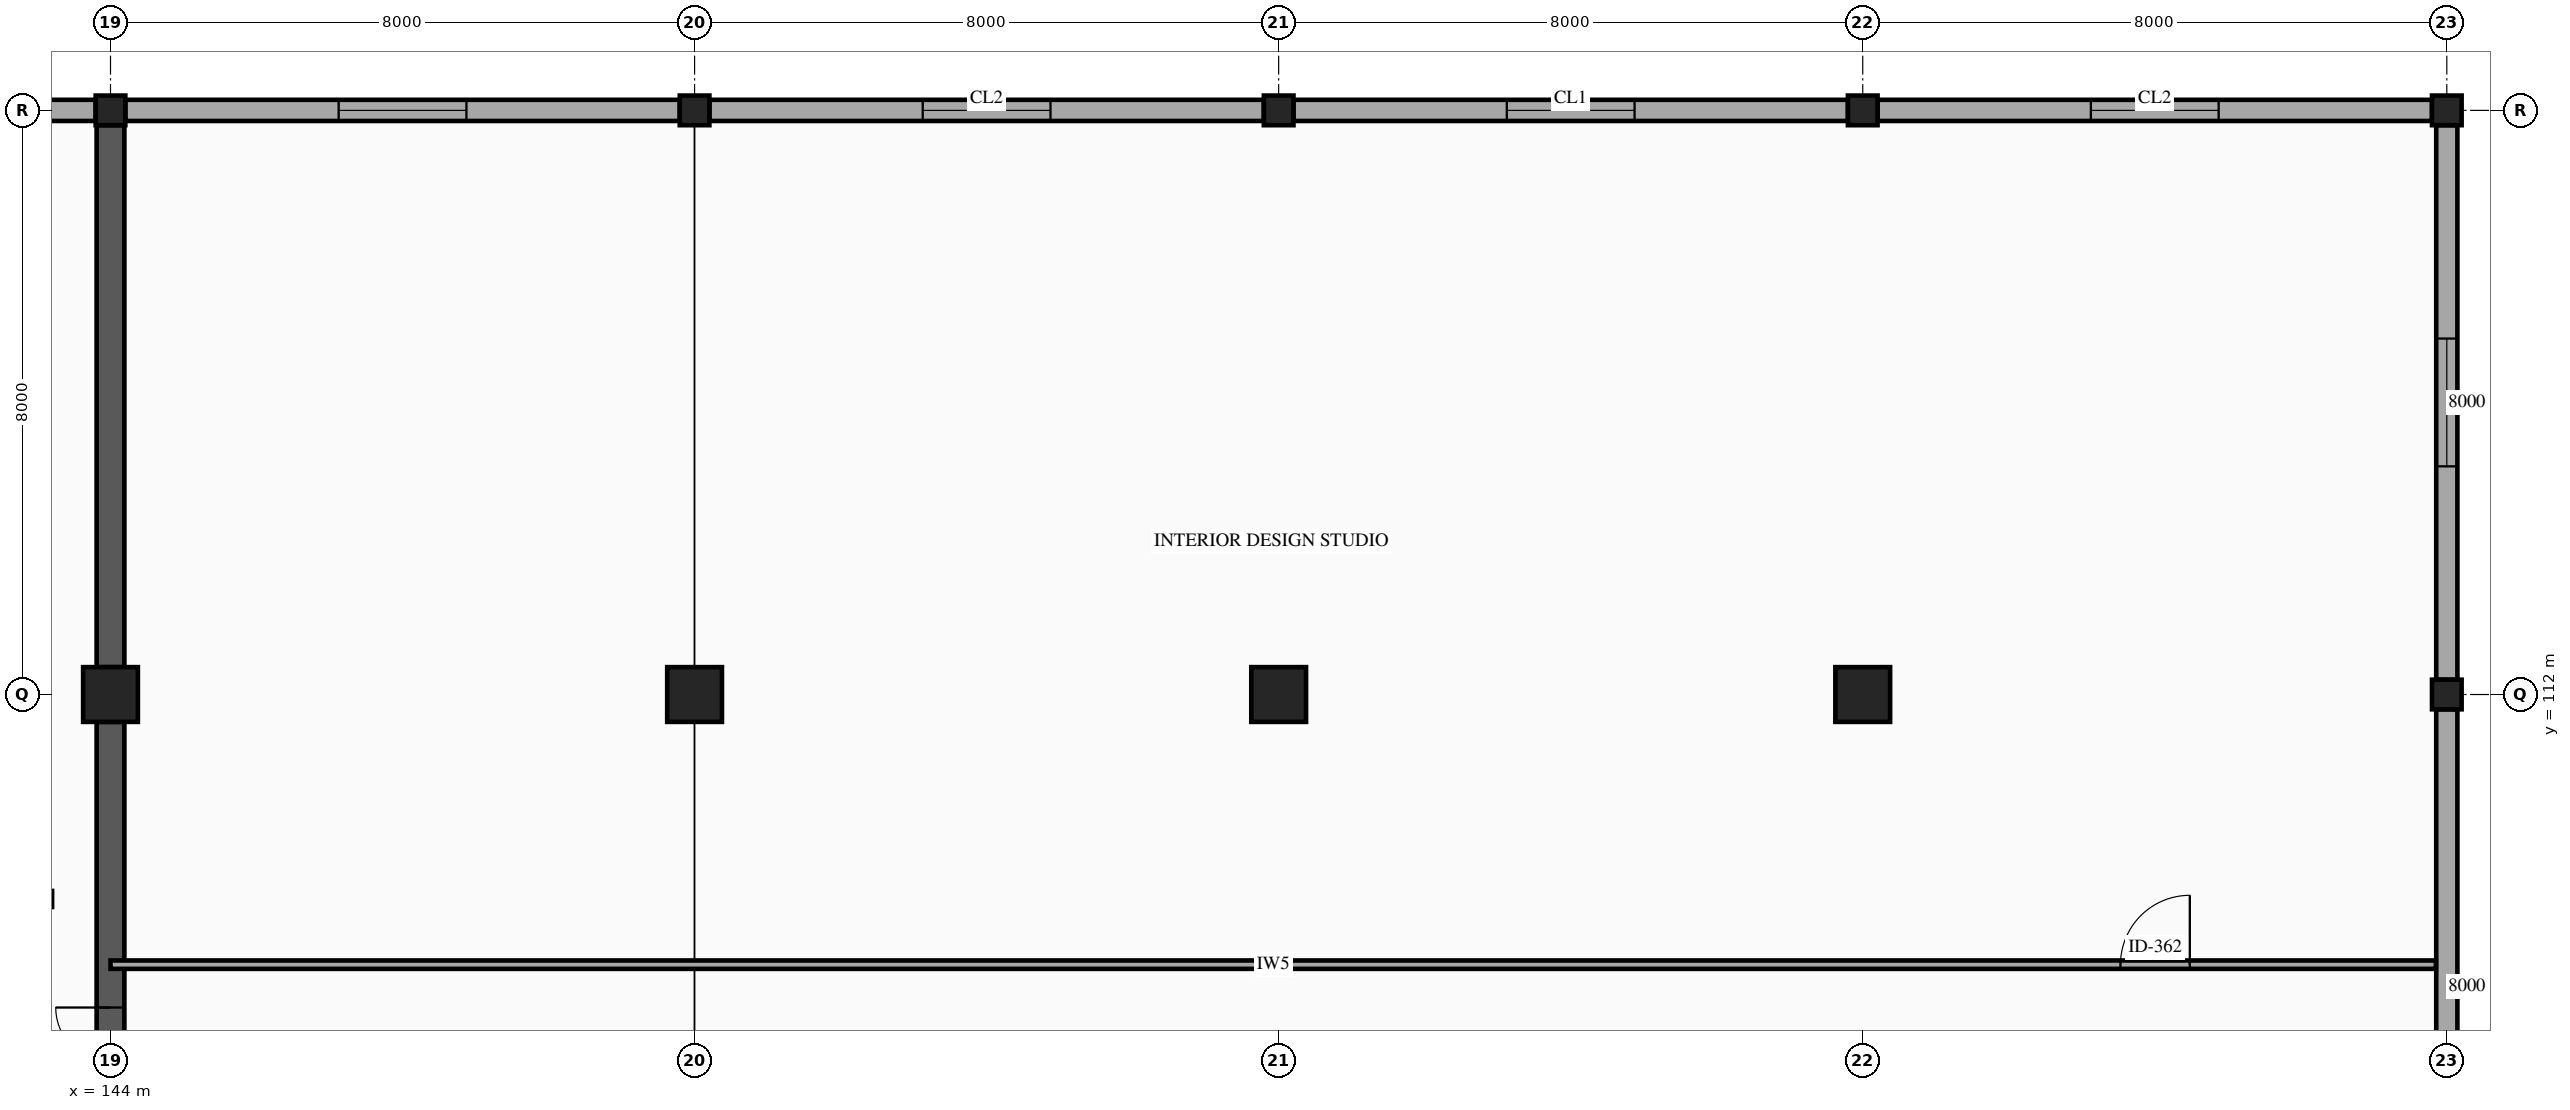
"""IFC4 building model, lengths in metres.
Left out: names, types, materials, properties, quantities, classifications, styles, units other than length and angle.
Written with IfcOpenShell. Run it as: python <this file> out.ifc"""

import sys

from ifc_helpers import new_model, si_unit, direction, frame, frame_2d, origin, origin_2d, place, context, subcontext, project, spatial, rectangle, hollow_rectangle, extrude, element, fill, save


model = new_model("IFC4")
c1 = context("Model", 3, precision=1e-05, world=origin(), true_north=direction((0.0, 1.0)))
c2 = subcontext(c1, "Body", "Model", "MODEL_VIEW")
j1 = project(units=[si_unit("LENGTHUNIT", "METRE"), si_unit("PLANEANGLEUNIT", "RADIAN")], contexts=[c1])
p1 = place(None, origin())
s1 = spatial("IfcSite", under=j1, at=p1, CompositionType="ELEMENT")
p2 = place(p1, origin())
s2 = spatial("IfcBuilding", under=s1, at=p2, CompositionType="ELEMENT")
p3 = place(p2, frame((0.0, 0.0, 19.4)))
s3 = spatial("IfcBuildingStorey", under=s2, at=p3, CompositionType="ELEMENT", Elevation=19.4)
p4 = place(p3, frame((144.0, 112.0, 0.0), z_axis=(0.0, 0.0, 1.0), x_axis=(1.0, 0.0, 0.0)))
e1 = element("IfcColumn", 1, at=p4, inside=s3, PredefinedType="COLUMN", context=c2, shape_type="SweptSolid", body=[
    extrude(rectangle(XDim=0.75, YDim=0.75, at=origin_2d()), origin(), (0.0, 0.0, 1.0), 4.5),
])
p5 = place(p3, frame((144.0, 120.0, 0.0), z_axis=(0.0, 0.0, 1.0), x_axis=(1.0, 0.0, 0.0)))
e2 = element("IfcColumn", 2, at=p5, inside=s3, PredefinedType="COLUMN", context=c2, shape_type="SweptSolid", body=[
    extrude(hollow_rectangle(XDim=0.406, YDim=0.406, WallThickness=0.015, InnerFilletRadius=0.015, OuterFilletRadius=0.029, at=origin_2d()), origin(), (0.0, 0.0, 1.0), 4.5),
])
p6 = place(p3, frame((152.0, 112.0, 0.0), z_axis=(0.0, 0.0, 1.0), x_axis=(1.0, 0.0, 0.0)))
e3 = element("IfcColumn", 3, at=p6, inside=s3, PredefinedType="COLUMN", context=c2, shape_type="SweptSolid", body=[
    extrude(rectangle(XDim=0.75, YDim=0.75, at=origin_2d()), origin(), (0.0, 0.0, 1.0), 4.5),
])
p7 = place(p3, frame((152.0, 120.0, 0.0), z_axis=(0.0, 0.0, 1.0), x_axis=(1.0, 0.0, 0.0)))
e4 = element("IfcColumn", 4, at=p7, inside=s3, PredefinedType="COLUMN", context=c2, shape_type="SweptSolid", body=[
    extrude(hollow_rectangle(XDim=0.406, YDim=0.406, WallThickness=0.015, InnerFilletRadius=0.015, OuterFilletRadius=0.029, at=origin_2d()), origin(), (0.0, 0.0, 1.0), 4.5),
])
p8 = place(p3, frame((160.0, 112.0, 0.0), z_axis=(0.0, 0.0, 1.0), x_axis=(1.0, 0.0, 0.0)))
e5 = element("IfcColumn", 5, at=p8, inside=s3, PredefinedType="COLUMN", context=c2, shape_type="SweptSolid", body=[
    extrude(rectangle(XDim=0.75, YDim=0.75, at=origin_2d()), origin(), (0.0, 0.0, 1.0), 4.5),
])
p9 = place(p3, frame((160.0, 120.0, 0.0), z_axis=(0.0, 0.0, 1.0), x_axis=(1.0, 0.0, 0.0)))
e6 = element("IfcColumn", 6, at=p9, inside=s3, PredefinedType="COLUMN", context=c2, shape_type="SweptSolid", body=[
    extrude(hollow_rectangle(XDim=0.406, YDim=0.406, WallThickness=0.015, InnerFilletRadius=0.015, OuterFilletRadius=0.029, at=origin_2d()), origin(), (0.0, 0.0, 1.0), 4.5),
])
p10 = place(p3, frame((168.0, 112.0, 0.0), z_axis=(0.0, 0.0, 1.0), x_axis=(1.0, 0.0, 0.0)))
e7 = element("IfcColumn", 7, at=p10, inside=s3, PredefinedType="COLUMN", context=c2, shape_type="SweptSolid", body=[
    extrude(rectangle(XDim=0.75, YDim=0.75, at=origin_2d()), origin(), (0.0, 0.0, 1.0), 4.5),
])
for number, where, z_axis, x_axis in (
    (8, (168.0, 120.0, 0.0), (0.0, 0.0, 1.0), (1.0, 0.0, 0.0)),
    (9, (176.0, 112.0, 0.0), (0.0, 0.0, 1.0), (1.0, 0.0, 0.0)),
    (10, (176.0, 120.0, 0.0), (0.0, 0.0, 1.0), (1.0, 0.0, 0.0)),
):
    element("IfcColumn", number, at=place(p3, frame(where, z_axis=z_axis, x_axis=x_axis)), inside=s3, PredefinedType="COLUMN", context=c2, shape_type="SweptSolid", body=[
        extrude(hollow_rectangle(XDim=0.406, YDim=0.406, WallThickness=0.015, InnerFilletRadius=0.015, OuterFilletRadius=0.029, at=origin_2d()), origin(), (0.0, 0.0, 1.0), 4.5),
    ])
p11 = place(p3, frame((152.203, 120.0, 0.0), z_axis=(0.0, 0.0, 1.0), x_axis=(1.0, 0.0, 0.0)))
e11 = element("IfcWall", 11, at=p11, inside=s3, PredefinedType="STANDARD", context=c2, shape_type="SweptSolid", body=[
    extrude(rectangle(XDim=7.594, YDim=0.29, at=frame_2d((3.797, 0.0))), origin(), (0.0, 0.0, 1.0), 3.48),
])
p12 = place(p11, frame((2.922, 0.0, 0.8)))
e12 = element("IfcOpeningElement", 12, at=p12, cuts=e11, PredefinedType="OPENING", context=c2, shape_type="SweptSolid", body=[
    extrude(rectangle(XDim=1.75, YDim=1.5, at=frame_2d((0.875, 0.75))), frame((0.0, 0.155, 0.0), z_axis=(0.0, -1.0, 0.0), x_axis=(1.0, 0.0, 0.0)), (0.0, 0.0, 1.0), 0.31),
])
p13 = place(p3, frame((160.203, 120.0, 0.0), z_axis=(0.0, 0.0, 1.0), x_axis=(1.0, 0.0, 0.0)))
e13 = element("IfcWall", 13, at=p13, inside=s3, PredefinedType="STANDARD", context=c2, shape_type="SweptSolid", body=[
    extrude(rectangle(XDim=7.594, YDim=0.29, at=frame_2d((3.797, 0.0))), origin(), (0.0, 0.0, 1.0), 3.48),
])
p14 = place(p13, frame((2.922, 0.0, 0.8)))
e14 = element("IfcOpeningElement", 14, at=p14, cuts=e13, PredefinedType="OPENING", context=c2, shape_type="SweptSolid", body=[
    extrude(rectangle(XDim=1.75, YDim=1.5, at=frame_2d((0.875, 0.75))), frame((0.0, 0.155, 0.0), z_axis=(0.0, -1.0, 0.0), x_axis=(1.0, 0.0, 0.0)), (0.0, 0.0, 1.0), 0.31),
])
p15 = place(p3, frame((168.203, 120.0, 0.0), z_axis=(0.0, 0.0, 1.0), x_axis=(1.0, 0.0, 0.0)))
e15 = element("IfcWall", 15, at=p15, inside=s3, PredefinedType="STANDARD", context=c2, shape_type="SweptSolid", body=[
    extrude(rectangle(XDim=7.594, YDim=0.29, at=frame_2d((3.797, 0.0))), origin(), (0.0, 0.0, 1.0), 3.48),
])
p16 = place(p15, frame((2.922, 0.0, 0.8)))
e16 = element("IfcOpeningElement", 16, at=p16, cuts=e15, PredefinedType="OPENING", context=c2, shape_type="SweptSolid", body=[
    extrude(rectangle(XDim=1.75, YDim=1.5, at=frame_2d((0.875, 0.75))), frame((0.0, 0.155, 0.0), z_axis=(0.0, -1.0, 0.0), x_axis=(1.0, 0.0, 0.0)), (0.0, 0.0, 1.0), 0.31),
])
p17 = place(p3, frame((176.0, 119.797, 0.0), z_axis=(0.0, 0.0, 1.0), x_axis=(0.0, -1.0, 0.0)))
e17 = element("IfcWall", 17, at=p17, inside=s3, PredefinedType="STANDARD", context=c2, shape_type="SweptSolid", body=[
    extrude(rectangle(XDim=7.594, YDim=0.29, at=frame_2d((3.797, 0.0))), origin(), (0.0, 0.0, 1.0), 3.48),
])
p18 = place(p17, frame((2.922, 0.0, 0.8)))
e18 = element("IfcOpeningElement", 18, at=p18, cuts=e17, PredefinedType="OPENING", context=c2, shape_type="SweptSolid", body=[
    extrude(rectangle(XDim=1.75, YDim=1.5, at=frame_2d((0.875, 0.75))), frame((0.0, 0.155, 0.0), z_axis=(0.0, -1.0, 0.0), x_axis=(1.0, 0.0, 0.0)), (0.0, 0.0, 1.0), 0.31),
])
for number, where, z_axis, x_axis in (
    (19, (176.0, 111.797, 0.0), (0.0, 0.0, 1.0), (0.0, -1.0, 0.0)),
    (20, (136.203, 120.0, 0.0), (0.0, 0.0, 1.0), (1.0, 0.0, 0.0)),
):
    element("IfcWall", number, at=place(p3, frame(where, z_axis=z_axis, x_axis=x_axis)), inside=s3, PredefinedType="STANDARD", context=c2, shape_type="SweptSolid", body=[
        extrude(rectangle(XDim=7.594, YDim=0.29, at=frame_2d((3.797, 0.0))), origin(), (0.0, 0.0, 1.0), 3.48),
    ])
p19 = place(p3, frame((144.203, 120.0, 0.0), z_axis=(0.0, 0.0, 1.0), x_axis=(1.0, 0.0, 0.0)))
e21 = element("IfcWall", 21, at=p19, inside=s3, PredefinedType="STANDARD", context=c2, shape_type="SweptSolid", body=[
    extrude(rectangle(XDim=7.594, YDim=0.29, at=frame_2d((3.797, 0.0))), origin(), (0.0, 0.0, 1.0), 3.48),
])
p20 = place(p19, frame((2.922, 0.0, 0.8)))
e22 = element("IfcOpeningElement", 22, at=p20, cuts=e21, PredefinedType="OPENING", context=c2, shape_type="SweptSolid", body=[
    extrude(rectangle(XDim=1.75, YDim=1.5, at=frame_2d((0.875, 0.75))), frame((0.0, 0.155, 0.0), z_axis=(0.0, -1.0, 0.0), x_axis=(1.0, 0.0, 0.0)), (0.0, 0.0, 1.0), 0.31),
])
p21 = place(p3, frame((144.0, 104.375, 0.0), z_axis=(0.0, 0.0, 1.0), x_axis=(0.0, 1.0, 0.0)))
e23 = element("IfcWall", 23, at=p21, inside=s3, PredefinedType="SHEAR", context=c2, shape_type="SweptSolid", body=[
    extrude(rectangle(XDim=7.25, YDim=0.38, at=frame_2d((3.625, 0.0))), origin(), (0.0, 0.0, 1.0), 4.28),
])
p22 = place(p21, frame((1.838, 0.0, 0.0)))
e24 = element("IfcOpeningElement", 24, at=p22, cuts=e23, PredefinedType="OPENING", context=c2, shape_type="SweptSolid", body=[
    extrude(rectangle(XDim=1.5, YDim=2.15, at=frame_2d((0.75, 1.075))), frame((0.0, 0.2, 0.0), z_axis=(0.0, -1.0, 0.0), x_axis=(1.0, 0.0, 0.0)), (0.0, 0.0, 1.0), 0.4),
])
p23 = place(p3, frame((144.0, 112.375, 0.0), z_axis=(0.0, 0.0, 1.0), x_axis=(0.0, 1.0, 0.0)))
e25 = element("IfcWall", 25, at=p23, inside=s3, PredefinedType="SHEAR", context=c2, shape_type="SweptSolid", body=[
    extrude(rectangle(XDim=7.422, YDim=0.38, at=frame_2d((3.711, 0.0))), origin(), (0.0, 0.0, 1.0), 4.28),
])
p24 = place(p3, frame((144.0, 108.3, 0.0), z_axis=(0.0, 0.0, 1.0), x_axis=(1.0, 0.0, 0.0)))
e26 = element("IfcWall", 26, at=p24, inside=s3, PredefinedType="PARTITIONING", context=c2, shape_type="SweptSolid", body=[
    extrude(rectangle(XDim=31.85, YDim=0.115, at=frame_2d((15.925, 0.0))), origin(), (0.0, 0.0, 1.0), 3.48),
])
p25 = place(p24, frame((27.53, 0.0, 0.0)))
e27 = element("IfcOpeningElement", 27, at=p25, cuts=e26, PredefinedType="OPENING", context=c2, shape_type="SweptSolid", body=[
    extrude(rectangle(XDim=0.95, YDim=2.1, at=frame_2d((0.475, 1.05))), frame((0.0, 0.067, 0.0), z_axis=(0.0, -1.0, 0.0), x_axis=(1.0, 0.0, 0.0)), (0.0, 0.0, 1.0), 0.135),
])
p26 = place(p12, origin())
e28 = element("IfcWindow", 28, at=p26, inside=s3, PartitioningType="SINGLE_PANEL", PredefinedType="WINDOW", context=c2, shape_type="SweptSolid", body=[
    extrude(rectangle(XDim=1.75, YDim=1.5, at=frame_2d((0.875, 0.75))), frame((0.0, 0.03, 0.0), z_axis=(0.0, -1.0, 0.0), x_axis=(1.0, 0.0, 0.0)), (0.0, 0.0, 1.0), 0.06),
])
fill(e12, e28)
p27 = place(p14, origin())
e29 = element("IfcWindow", 29, at=p27, inside=s3, PartitioningType="SINGLE_PANEL", PredefinedType="WINDOW", context=c2, shape_type="SweptSolid", body=[
    extrude(rectangle(XDim=1.75, YDim=1.5, at=frame_2d((0.875, 0.75))), frame((0.0, 0.03, 0.0), z_axis=(0.0, -1.0, 0.0), x_axis=(1.0, 0.0, 0.0)), (0.0, 0.0, 1.0), 0.06),
])
fill(e14, e29)
p28 = place(p16, origin())
e30 = element("IfcWindow", 30, at=p28, inside=s3, PartitioningType="SINGLE_PANEL", PredefinedType="WINDOW", context=c2, shape_type="SweptSolid", body=[
    extrude(rectangle(XDim=1.75, YDim=1.5, at=frame_2d((0.875, 0.75))), frame((0.0, 0.03, 0.0), z_axis=(0.0, -1.0, 0.0), x_axis=(1.0, 0.0, 0.0)), (0.0, 0.0, 1.0), 0.06),
])
fill(e16, e30)
p29 = place(p18, origin())
e31 = element("IfcWindow", 31, at=p29, inside=s3, PartitioningType="SINGLE_PANEL", PredefinedType="WINDOW", context=c2, shape_type="SweptSolid", body=[
    extrude(rectangle(XDim=1.75, YDim=1.5, at=frame_2d((0.875, 0.75))), frame((0.0, 0.03, 0.0), z_axis=(0.0, -1.0, 0.0), x_axis=(1.0, 0.0, 0.0)), (0.0, 0.0, 1.0), 0.06),
])
fill(e18, e31)
p30 = place(p20, origin())
e32 = element("IfcWindow", 32, at=p30, inside=s3, PartitioningType="SINGLE_PANEL", PredefinedType="WINDOW", context=c2, shape_type="SweptSolid", body=[
    extrude(rectangle(XDim=1.75, YDim=1.5, at=frame_2d((0.875, 0.75))), frame((0.0, 0.03, 0.0), z_axis=(0.0, -1.0, 0.0), x_axis=(1.0, 0.0, 0.0)), (0.0, 0.0, 1.0), 0.06),
])
fill(e22, e32)
p31 = place(p22, origin())
e33 = element("IfcDoor", 33, at=p31, inside=s3, OperationType="DOUBLE_DOOR_SINGLE_SWING", PredefinedType="DOOR", context=c2, shape_type="SweptSolid", body=[
    extrude(rectangle(XDim=1.5, YDim=2.15, at=frame_2d((0.75, 1.075))), frame((0.0, 0.025, 0.0), z_axis=(0.0, -1.0, 0.0), x_axis=(1.0, 0.0, 0.0)), (0.0, 0.0, 1.0), 0.05),
])
fill(e24, e33)
p32 = place(p25, origin())
e34 = element("IfcDoor", 34, at=p32, inside=s3, OperationType="SINGLE_SWING_RIGHT", PredefinedType="DOOR", context=c2, shape_type="SweptSolid", body=[
    extrude(rectangle(XDim=0.95, YDim=2.1, at=frame_2d((0.475, 1.05))), frame((0.0, 0.025, 0.0), z_axis=(0.0, -1.0, 0.0), x_axis=(1.0, 0.0, 0.0)), (0.0, 0.0, 1.0), 0.05),
])
fill(e27, e34)
save(model, sys.argv[1])
